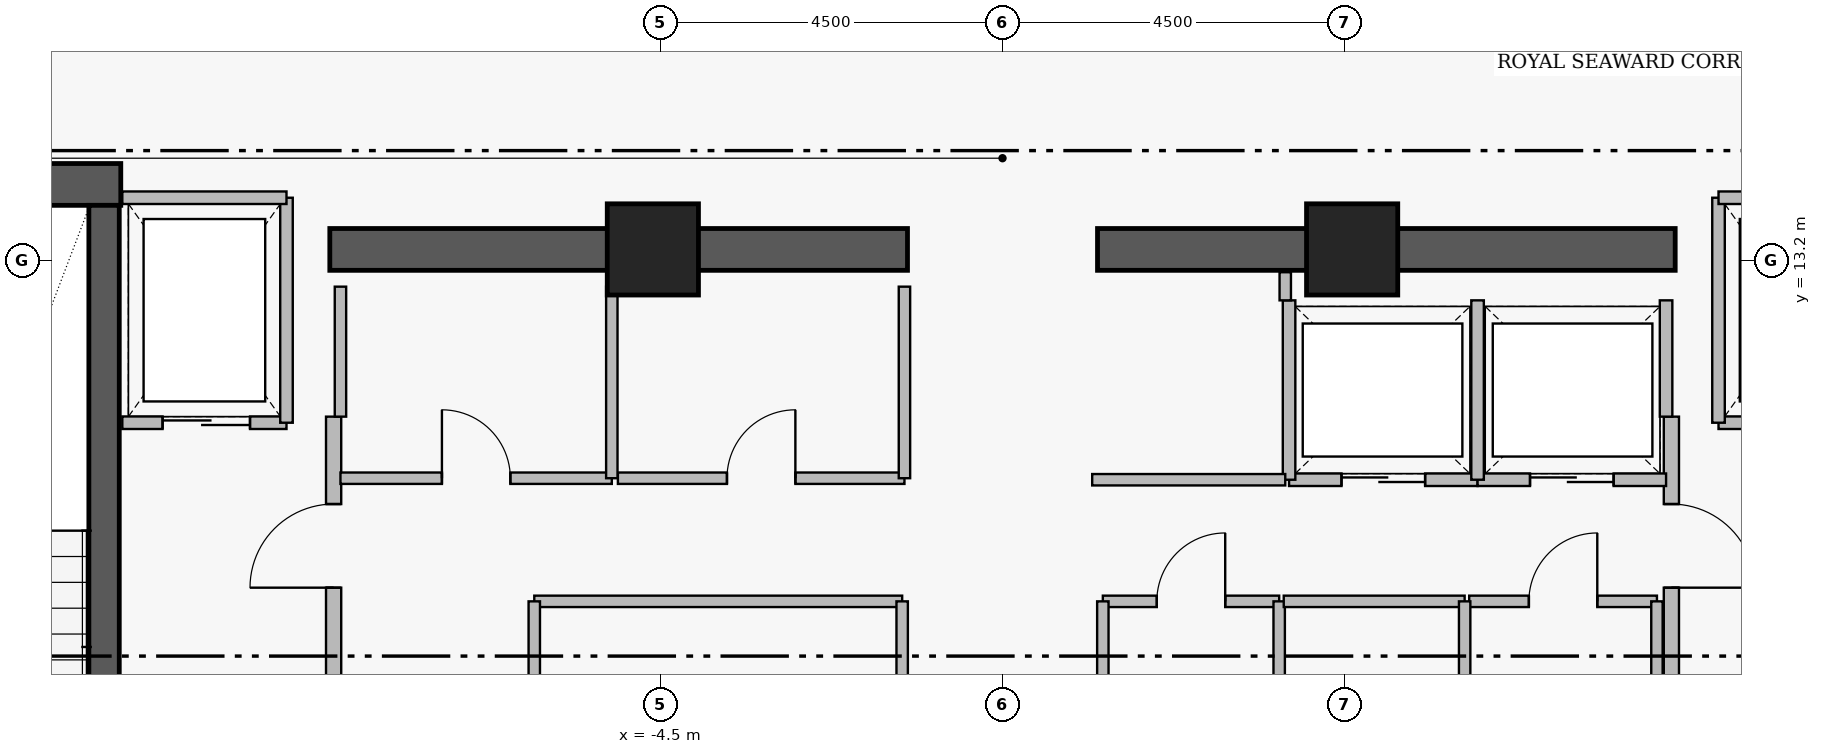
"""IFC4 building model, lengths in metres.
Left out: names, types, materials, properties, quantities, classifications, styles, units other than length and angle.
Written with IfcOpenShell. Run it as: python <this file> out.ifc"""

import sys

from ifc_helpers import new_model, si_unit, direction, frame, frame_2d, origin, origin_2d, place, context, subcontext, project, spatial, rectangle, extrude, element, fill, save


model = new_model("IFC4")
c1 = context("Model", 3, precision=1e-05, world=origin(), true_north=direction((0.0, 1.0)))
c2 = subcontext(c1, "Body", "Model", "MODEL_VIEW")
j1 = project(units=[si_unit("LENGTHUNIT", "METRE"), si_unit("PLANEANGLEUNIT", "RADIAN")], contexts=[c1])
p1 = place(None, origin())
s1 = spatial("IfcSite", under=j1, at=p1, CompositionType="ELEMENT")
p2 = place(p1, origin())
s2 = spatial("IfcBuilding", under=s1, at=p2, CompositionType="ELEMENT")
p3 = place(p2, frame((0.0, 0.0, 239.65)))
s3 = spatial("IfcBuildingStorey", under=s2, at=p3, CompositionType="ELEMENT", Elevation=239.65)
p4 = place(p3, frame((-15.96, 14.205, 0.0), z_axis=(0.0, 0.0, 1.0), x_axis=(1.0, 0.0, 0.0)))
e1 = element("IfcWall", 1, at=p4, inside=s3, PredefinedType="SHEAR", context=c2, shape_type="SweptSolid", body=[
    extrude(rectangle(XDim=4.36, YDim=0.55, at=frame_2d((2.18, 0.0))), origin(), (0.0, 0.0, 1.0), 3.51),
])
for number, where, z_axis, x_axis in (
    (2, (-8.85, 13.35, 0.0), (0.0, 0.0, 1.0), (1.0, 0.0, 0.0)),
    (3, (1.25, 13.35, 0.0), (0.0, 0.0, 1.0), (1.0, 0.0, 0.0)),
):
    element("IfcWall", number, at=place(p3, frame(where, z_axis=z_axis, x_axis=x_axis)), inside=s3, PredefinedType="SHEAR", context=c2, shape_type="SweptSolid", body=[
        extrude(rectangle(XDim=7.6, YDim=0.55, at=frame_2d((3.8, 0.0))), origin(), (0.0, 0.0, 1.0), 3.48),
    ])
p5 = place(p3, frame((-11.82, 4.97, 0.0), z_axis=(0.0, 0.0, 1.0), x_axis=(0.0, 1.0, 0.0)))
e4 = element("IfcWall", 4, at=p5, inside=s3, PredefinedType="SHEAR", context=c2, shape_type="SweptSolid", body=[
    extrude(rectangle(XDim=8.96, YDim=0.4, at=frame_2d((4.48, 0.0))), origin(), (0.0, 0.0, 1.0), 3.51),
])
p6 = place(p5, frame((0.31, 0.0, 0.0)))
e5 = element("IfcOpeningElement", 5, at=p6, cuts=e4, PredefinedType="OPENING", context=c2, shape_type="SweptSolid", body=[
    extrude(rectangle(XDim=1.12, YDim=2.22, at=frame_2d((0.56, 1.11))), frame((0.0, 0.21, 0.0), z_axis=(0.0, -1.0, 0.0), x_axis=(1.0, 0.0, 0.0)), (0.0, 0.0, 1.0), 0.42),
])
for number, where, z_axis, x_axis in (
    (6, (-4.6, 13.35, 0.0), (0.0, 0.0, 1.0), (1.0, 0.0, 0.0)),
    (7, (4.6, 13.35, 0.0), (0.0, 0.0, 1.0), (1.0, 0.0, 0.0)),
):
    element("IfcColumn", number, at=place(p3, frame(where, z_axis=z_axis, x_axis=x_axis)), inside=s3, PredefinedType="COLUMN", context=c2, shape_type="SweptSolid", body=[
        extrude(rectangle(XDim=1.2, YDim=1.2, at=origin_2d()), origin(), (0.0, 0.0, 1.0), 3.7),
    ])
p7 = place(p3, frame((-8.8, 5.05, 0.0), z_axis=(0.0, 0.0, 1.0), x_axis=(0.0, 1.0, 0.0)))
e8 = element("IfcWall", 8, at=p7, inside=s3, PredefinedType="PARTITIONING", context=c2, shape_type="SweptSolid", body=[
    extrude(rectangle(XDim=6.1, YDim=0.2, at=frame_2d((3.05, 0.0))), origin(), (0.0, 0.0, 1.0), 3.48),
])
p8 = place(p7, frame((0.25, 0.0, 0.0)))
e9 = element("IfcOpeningElement", 9, at=p8, cuts=e8, PredefinedType="OPENING", context=c2, shape_type="SweptSolid", body=[
    extrude(rectangle(XDim=1.1, YDim=2.2, at=frame_2d((0.55, 1.1))), frame((0.0, 0.11, 0.0), z_axis=(0.0, -1.0, 0.0), x_axis=(1.0, 0.0, 0.0)), (0.0, 0.0, 1.0), 0.22),
])
p9 = place(p7, frame((3.85, 0.0, 0.0)))
e10 = element("IfcOpeningElement", 10, at=p9, cuts=e8, PredefinedType="OPENING", context=c2, shape_type="SweptSolid", body=[
    extrude(rectangle(XDim=1.1, YDim=2.2, at=frame_2d((0.55, 1.1))), frame((0.0, 0.11, 0.0), z_axis=(0.0, -1.0, 0.0), x_axis=(1.0, 0.0, 0.0)), (0.0, 0.0, 1.0), 0.22),
])
p10 = place(p3, frame((8.8, 11.15, 0.0), z_axis=(0.0, 0.0, 1.0), x_axis=(0.0, -1.0, 0.0)))
e11 = element("IfcWall", 11, at=p10, inside=s3, PredefinedType="PARTITIONING", context=c2, shape_type="SweptSolid", body=[
    extrude(rectangle(XDim=6.1, YDim=0.2, at=frame_2d((3.05, 0.0))), origin(), (0.0, 0.0, 1.0), 3.48),
])
p11 = place(p10, frame((1.15, 0.0, 0.0)))
e12 = element("IfcOpeningElement", 12, at=p11, cuts=e11, PredefinedType="OPENING", context=c2, shape_type="SweptSolid", body=[
    extrude(rectangle(XDim=1.1, YDim=2.2, at=frame_2d((0.55, 1.1))), frame((0.0, 0.11, 0.0), z_axis=(0.0, -1.0, 0.0), x_axis=(1.0, 0.0, 0.0)), (0.0, 0.0, 1.0), 0.22),
])
p12 = place(p10, frame((4.75, 0.0, 0.0)))
e13 = element("IfcOpeningElement", 13, at=p12, cuts=e11, PredefinedType="OPENING", context=c2, shape_type="SweptSolid", body=[
    extrude(rectangle(XDim=1.1, YDim=2.2, at=frame_2d((0.55, 1.1))), frame((0.0, 0.11, 0.0), z_axis=(0.0, -1.0, 0.0), x_axis=(1.0, 0.0, 0.0)), (0.0, 0.0, 1.0), 0.22),
])
p13 = place(p3, frame((-11.58, 11.07, 0.0), z_axis=(0.0, 0.0, 1.0), x_axis=(1.0, 0.0, 0.0)))
e14 = element("IfcWall", 14, at=p13, inside=s3, PredefinedType="PARTITIONING", context=c2, shape_type="SweptSolid", body=[
    extrude(rectangle(XDim=2.16, YDim=0.165, at=frame_2d((1.08, 0.0))), origin(), (0.0, 0.0, 1.0), 3.48),
])
p14 = place(p13, frame((0.53, 0.0, 0.0)))
e15 = element("IfcOpeningElement", 15, at=p14, cuts=e14, PredefinedType="OPENING", context=c2, shape_type="SweptSolid", body=[
    extrude(rectangle(XDim=1.15, YDim=2.25, at=frame_2d((0.575, 1.125))), frame((0.0, 0.093, 0.0), z_axis=(0.0, -1.0, 0.0), x_axis=(1.0, 0.0, 0.0)), (0.0, 0.0, 1.0), 0.185),
])
p15 = place(p3, frame((9.42, 11.07, 0.0), z_axis=(0.0, 0.0, 1.0), x_axis=(1.0, 0.0, 0.0)))
e16 = element("IfcWall", 16, at=p15, inside=s3, PredefinedType="PARTITIONING", context=c2, shape_type="SweptSolid", body=[
    extrude(rectangle(XDim=2.16, YDim=0.165, at=frame_2d((1.08, 0.0))), origin(), (0.0, 0.0, 1.0), 3.48),
])
p16 = place(p15, frame((0.53, 0.0, 0.0)))
e17 = element("IfcOpeningElement", 17, at=p16, cuts=e16, PredefinedType="OPENING", context=c2, shape_type="SweptSolid", body=[
    extrude(rectangle(XDim=1.15, YDim=2.25, at=frame_2d((0.575, 1.125))), frame((0.0, 0.093, 0.0), z_axis=(0.0, -1.0, 0.0), x_axis=(1.0, 0.0, 0.0)), (0.0, 0.0, 1.0), 0.185),
])
p17 = place(p3, frame((3.77, 10.32, 0.0), z_axis=(0.0, 0.0, 1.0), x_axis=(1.0, 0.0, 0.0)))
e18 = element("IfcWall", 18, at=p17, inside=s3, PredefinedType="PARTITIONING", context=c2, shape_type="SweptSolid", body=[
    extrude(rectangle(XDim=2.48, YDim=0.165, at=frame_2d((1.24, 0.0))), origin(), (0.0, 0.0, 1.0), 3.48),
])
p18 = place(p17, frame((0.69, 0.0, 0.0)))
e19 = element("IfcOpeningElement", 19, at=p18, cuts=e18, PredefinedType="OPENING", context=c2, shape_type="SweptSolid", body=[
    extrude(rectangle(XDim=1.1, YDim=2.25, at=frame_2d((0.55, 1.125))), frame((0.0, 0.093, 0.0), z_axis=(0.0, -1.0, 0.0), x_axis=(1.0, 0.0, 0.0)), (0.0, 0.0, 1.0), 0.185),
])
p19 = place(p3, frame((6.25, 10.32, 0.0), z_axis=(0.0, 0.0, 1.0), x_axis=(1.0, 0.0, 0.0)))
e20 = element("IfcWall", 20, at=p19, inside=s3, PredefinedType="PARTITIONING", context=c2, shape_type="SweptSolid", body=[
    extrude(rectangle(XDim=2.48, YDim=0.165, at=frame_2d((1.24, 0.0))), origin(), (0.0, 0.0, 1.0), 3.48),
])
p20 = place(p19, frame((0.69, 0.0, 0.0)))
e21 = element("IfcOpeningElement", 21, at=p20, cuts=e20, PredefinedType="OPENING", context=c2, shape_type="SweptSolid", body=[
    extrude(rectangle(XDim=1.1, YDim=2.25, at=frame_2d((0.55, 1.125))), frame((0.0, 0.093, 0.0), z_axis=(0.0, -1.0, 0.0), x_axis=(1.0, 0.0, 0.0)), (0.0, 0.0, 1.0), 0.185),
])
p21 = place(p3, frame((-8.71, 10.34, 0.0), z_axis=(0.0, 0.0, 1.0), x_axis=(1.0, 0.0, 0.0)))
e22 = element("IfcWall", 22, at=p21, inside=s3, PredefinedType="PARTITIONING", context=c2, shape_type="SweptSolid", body=[
    extrude(rectangle(XDim=3.57, YDim=0.15, at=frame_2d((1.785, 0.0))), origin(), (0.0, 0.0, 1.0), 3.48),
])
p22 = place(p21, frame((1.335, 0.0, 0.0)))
e23 = element("IfcOpeningElement", 23, at=p22, cuts=e22, PredefinedType="OPENING", context=c2, shape_type="SweptSolid", body=[
    extrude(rectangle(XDim=0.9, YDim=2.15, at=frame_2d((0.45, 1.075))), frame((0.0, 0.085, 0.0), z_axis=(0.0, -1.0, 0.0), x_axis=(1.0, 0.0, 0.0)), (0.0, 0.0, 1.0), 0.17),
])
p23 = place(p3, frame((-5.06, 10.34, 0.0), z_axis=(0.0, 0.0, 1.0), x_axis=(1.0, 0.0, 0.0)))
e24 = element("IfcWall", 24, at=p23, inside=s3, PredefinedType="PARTITIONING", context=c2, shape_type="SweptSolid", body=[
    extrude(rectangle(XDim=3.77, YDim=0.15, at=frame_2d((1.885, 0.0))), origin(), (0.0, 0.0, 1.0), 3.48),
])
p24 = place(p23, frame((1.435, 0.0, 0.0)))
e25 = element("IfcOpeningElement", 25, at=p24, cuts=e24, PredefinedType="OPENING", context=c2, shape_type="SweptSolid", body=[
    extrude(rectangle(XDim=0.9, YDim=2.15, at=frame_2d((0.45, 1.075))), frame((0.0, 0.085, 0.0), z_axis=(0.0, -1.0, 0.0), x_axis=(1.0, 0.0, 0.0)), (0.0, 0.0, 1.0), 0.17),
])
p25 = place(p3, frame((1.32, 8.72, 0.0), z_axis=(0.0, 0.0, 1.0), x_axis=(1.0, 0.0, 0.0)))
e26 = element("IfcWall", 26, at=p25, inside=s3, PredefinedType="PARTITIONING", context=c2, shape_type="SweptSolid", body=[
    extrude(rectangle(XDim=2.32, YDim=0.15, at=frame_2d((1.16, 0.0))), origin(), (0.0, 0.0, 1.0), 3.48),
])
p26 = place(p25, frame((0.71, 0.0, 0.0)))
e27 = element("IfcOpeningElement", 27, at=p26, cuts=e26, PredefinedType="OPENING", context=c2, shape_type="SweptSolid", body=[
    extrude(rectangle(XDim=0.9, YDim=2.15, at=frame_2d((0.45, 1.075))), frame((0.0, 0.085, 0.0), z_axis=(0.0, -1.0, 0.0), x_axis=(1.0, 0.0, 0.0)), (0.0, 0.0, 1.0), 0.17),
])
p27 = place(p3, frame((6.14, 8.72, 0.0), z_axis=(0.0, 0.0, 1.0), x_axis=(1.0, 0.0, 0.0)))
e28 = element("IfcWall", 28, at=p27, inside=s3, PredefinedType="PARTITIONING", context=c2, shape_type="SweptSolid", body=[
    extrude(rectangle(XDim=2.47, YDim=0.15, at=frame_2d((1.235, 0.0))), origin(), (0.0, 0.0, 1.0), 3.48),
])
p28 = place(p27, frame((0.785, 0.0, 0.0)))
e29 = element("IfcOpeningElement", 29, at=p28, cuts=e28, PredefinedType="OPENING", context=c2, shape_type="SweptSolid", body=[
    extrude(rectangle(XDim=0.9, YDim=2.15, at=frame_2d((0.45, 1.075))), frame((0.0, 0.085, 0.0), z_axis=(0.0, -1.0, 0.0), x_axis=(1.0, 0.0, 0.0)), (0.0, 0.0, 1.0), 0.17),
])
p29 = place(p3, frame((-9.42, 11.07, 0.0), z_axis=(0.0, 0.0, 1.0), x_axis=(0.0, 1.0, 0.0)))
e30 = element("IfcWall", 30, at=p29, inside=s3, PredefinedType="PARTITIONING", context=c2, shape_type="SweptSolid", body=[
    extrude(rectangle(XDim=2.96, YDim=0.165, at=frame_2d((1.48, 0.0))), origin(), (0.0, 0.0, 1.0), 3.48),
])
p30 = place(p3, frame((-11.58, 14.03, 0.0), z_axis=(0.0, 0.0, 1.0), x_axis=(1.0, 0.0, 0.0)))
e31 = element("IfcWall", 31, at=p30, inside=s3, PredefinedType="PARTITIONING", context=c2, shape_type="SweptSolid", body=[
    extrude(rectangle(XDim=2.16, YDim=0.165, at=frame_2d((1.08, 0.0))), origin(), (0.0, 0.0, 1.0), 3.48),
])
p31 = place(p3, frame((9.42, 11.07, 0.0), z_axis=(0.0, 0.0, 1.0), x_axis=(0.0, 1.0, 0.0)))
e32 = element("IfcWall", 32, at=p31, inside=s3, PredefinedType="PARTITIONING", context=c2, shape_type="SweptSolid", body=[
    extrude(rectangle(XDim=2.96, YDim=0.165, at=frame_2d((1.48, 0.0))), origin(), (0.0, 0.0, 1.0), 3.48),
])
p32 = place(p3, frame((9.42, 14.03, 0.0), z_axis=(0.0, 0.0, 1.0), x_axis=(1.0, 0.0, 0.0)))
e33 = element("IfcWall", 33, at=p32, inside=s3, PredefinedType="PARTITIONING", context=c2, shape_type="SweptSolid", body=[
    extrude(rectangle(XDim=2.16, YDim=0.165, at=frame_2d((1.08, 0.0))), origin(), (0.0, 0.0, 1.0), 3.48),
])
for number, where, z_axis, x_axis in (
    (34, (3.77, 10.32, 0.0), (0.0, 0.0, 1.0), (0.0, 1.0, 0.0)),
    (35, (6.25, 10.32, 0.0), (0.0, 0.0, 1.0), (0.0, 1.0, 0.0)),
):
    element("IfcWall", number, at=place(p3, frame(where, z_axis=z_axis, x_axis=x_axis)), inside=s3, PredefinedType="PARTITIONING", context=c2, shape_type="SweptSolid", body=[
        extrude(rectangle(XDim=2.36, YDim=0.165, at=frame_2d((1.18, 0.0))), origin(), (0.0, 0.0, 1.0), 3.48),
    ])
p33 = place(p3, frame((8.73, 11.15, 0.0), z_axis=(0.0, 0.0, 1.0), x_axis=(0.0, 1.0, 0.0)))
e36 = element("IfcWall", 36, at=p33, inside=s3, PredefinedType="PARTITIONING", context=c2, shape_type="SweptSolid", body=[
    extrude(rectangle(XDim=1.53, YDim=0.165, at=frame_2d((0.765, 0.0))), origin(), (0.0, 0.0, 1.0), 3.48),
])
p34 = place(p3, frame((-8.71, 11.15, 0.0), z_axis=(0.0, 0.0, 1.0), x_axis=(0.0, 1.0, 0.0)))
e37 = element("IfcWall", 37, at=p34, inside=s3, PredefinedType="PARTITIONING", context=c2, shape_type="SweptSolid", body=[
    extrude(rectangle(XDim=1.71, YDim=0.15, at=frame_2d((0.855, 0.0))), origin(), (0.0, 0.0, 1.0), 3.48),
])
for number, where, z_axis, x_axis in (
    (38, (-5.14, 10.34, 0.0), (0.0, 0.0, 1.0), (0.0, 1.0, 0.0)),
    (39, (-1.29, 10.34, 0.0), (0.0, 0.0, 1.0), (0.0, 1.0, 0.0)),
):
    element("IfcWall", number, at=place(p3, frame(where, z_axis=z_axis, x_axis=x_axis)), inside=s3, PredefinedType="PARTITIONING", context=c2, shape_type="SweptSolid", body=[
        extrude(rectangle(XDim=2.52, YDim=0.15, at=frame_2d((1.26, 0.0))), origin(), (0.0, 0.0, 1.0), 3.48),
    ])
p35 = place(p3, frame((-6.16, 8.72, 0.0), z_axis=(0.0, 0.0, 1.0), x_axis=(1.0, 0.0, 0.0)))
e40 = element("IfcWall", 40, at=p35, inside=s3, PredefinedType="PARTITIONING", context=c2, shape_type="SweptSolid", body=[
    extrude(rectangle(XDim=4.84, YDim=0.15, at=frame_2d((2.42, 0.0))), origin(), (0.0, 0.0, 1.0), 3.48),
])
for number, where, z_axis, x_axis in (
    (41, (-6.16, 6.48, 0.0), (0.0, 0.0, 1.0), (0.0, 1.0, 0.0)),
    (42, (-1.32, 6.48, 0.0), (0.0, 0.0, 1.0), (0.0, 1.0, 0.0)),
    (43, (1.32, 6.48, 0.0), (0.0, 0.0, 1.0), (0.0, 1.0, 0.0)),
    (44, (3.64, 6.48, 0.0), (0.0, 0.0, 1.0), (0.0, 1.0, 0.0)),
):
    element("IfcWall", number, at=place(p3, frame(where, z_axis=z_axis, x_axis=x_axis)), inside=s3, PredefinedType="PARTITIONING", context=c2, shape_type="SweptSolid", body=[
        extrude(rectangle(XDim=2.24, YDim=0.15, at=frame_2d((1.12, 0.0))), origin(), (0.0, 0.0, 1.0), 3.48),
    ])
p36 = place(p3, frame((3.7, 8.72, 0.0), z_axis=(0.0, 0.0, 1.0), x_axis=(1.0, 0.0, 0.0)))
e45 = element("IfcWall", 45, at=p36, inside=s3, PredefinedType="PARTITIONING", context=c2, shape_type="SweptSolid", body=[
    extrude(rectangle(XDim=2.38, YDim=0.15, at=frame_2d((1.19, 0.0))), origin(), (0.0, 0.0, 1.0), 3.48),
])
for number, where, z_axis, x_axis in (
    (46, (6.08, 6.48, 0.0), (0.0, 0.0, 1.0), (0.0, 1.0, 0.0)),
    (47, (8.61, 6.48, 0.0), (0.0, 0.0, 1.0), (0.0, 1.0, 0.0)),
):
    element("IfcWall", number, at=place(p3, frame(where, z_axis=z_axis, x_axis=x_axis)), inside=s3, PredefinedType="PARTITIONING", context=c2, shape_type="SweptSolid", body=[
        extrude(rectangle(XDim=2.24, YDim=0.15, at=frame_2d((1.12, 0.0))), origin(), (0.0, 0.0, 1.0), 3.48),
    ])
p37 = place(p3, frame((1.18, 10.32, 0.0), z_axis=(0.0, 0.0, 1.0), x_axis=(1.0, 0.0, 0.0)))
e48 = element("IfcWall", 48, at=p37, inside=s3, PredefinedType="PARTITIONING", context=c2, shape_type="SweptSolid", body=[
    extrude(rectangle(XDim=2.54, YDim=0.15, at=frame_2d((1.27, 0.0))), origin(), (0.0, 0.0, 1.0), 3.48),
])
p38 = place(p3, frame((3.72, 12.68, 0.0), z_axis=(0.0, 0.0, 1.0), x_axis=(0.0, 1.0, 0.0)))
e49 = element("IfcWall", 49, at=p38, inside=s3, PredefinedType="PARTITIONING", context=c2, shape_type="SweptSolid", body=[
    extrude(rectangle(XDim=0.37, YDim=0.15, at=frame_2d((0.185, 0.0))), origin(), (0.0, 0.0, 1.0), 3.48),
])
p39 = place(p9, origin())
e50 = element("IfcDoor", 50, at=p39, inside=s3, OperationType="SINGLE_SWING_LEFT", PredefinedType="DOOR", context=c2, shape_type="SweptSolid", body=[
    extrude(rectangle(XDim=1.1, YDim=2.2, at=frame_2d((0.55, 1.1))), frame((0.0, 0.025, 0.0), z_axis=(0.0, -1.0, 0.0), x_axis=(1.0, 0.0, 0.0)), (0.0, 0.0, 1.0), 0.05),
])
fill(e10, e50)
p40 = place(p11, origin())
e51 = element("IfcDoor", 51, at=p40, inside=s3, OperationType="SINGLE_SWING_RIGHT", PredefinedType="DOOR", context=c2, shape_type="SweptSolid", body=[
    extrude(rectangle(XDim=1.1, YDim=2.2, at=frame_2d((0.55, 1.1))), frame((0.0, 0.025, 0.0), z_axis=(0.0, -1.0, 0.0), x_axis=(1.0, 0.0, 0.0)), (0.0, 0.0, 1.0), 0.05),
])
fill(e12, e51)
p41 = place(p14, origin())
e52 = element("IfcDoor", 52, at=p41, inside=s3, OperationType="SLIDING_TO_LEFT", PredefinedType="DOOR", context=c2, shape_type="SweptSolid", body=[
    extrude(rectangle(XDim=1.15, YDim=2.25, at=frame_2d((0.575, 1.125))), frame((0.0, 0.025, 0.0), z_axis=(0.0, -1.0, 0.0), x_axis=(1.0, 0.0, 0.0)), (0.0, 0.0, 1.0), 0.05),
])
fill(e15, e52)
p42 = place(p18, origin())
e53 = element("IfcDoor", 53, at=p42, inside=s3, OperationType="SLIDING_TO_LEFT", PredefinedType="DOOR", context=c2, shape_type="SweptSolid", body=[
    extrude(rectangle(XDim=1.1, YDim=2.25, at=frame_2d((0.55, 1.125))), frame((0.0, 0.025, 0.0), z_axis=(0.0, -1.0, 0.0), x_axis=(1.0, 0.0, 0.0)), (0.0, 0.0, 1.0), 0.05),
])
fill(e19, e53)
p43 = place(p20, origin())
e54 = element("IfcDoor", 54, at=p43, inside=s3, OperationType="SLIDING_TO_LEFT", PredefinedType="DOOR", context=c2, shape_type="SweptSolid", body=[
    extrude(rectangle(XDim=1.1, YDim=2.25, at=frame_2d((0.55, 1.125))), frame((0.0, 0.025, 0.0), z_axis=(0.0, -1.0, 0.0), x_axis=(1.0, 0.0, 0.0)), (0.0, 0.0, 1.0), 0.05),
])
fill(e21, e54)
p44 = place(p22, origin())
e55 = element("IfcDoor", 55, at=p44, inside=s3, OperationType="SINGLE_SWING_LEFT", PredefinedType="DOOR", context=c2, shape_type="SweptSolid", body=[
    extrude(rectangle(XDim=0.9, YDim=2.15, at=frame_2d((0.45, 1.075))), frame((0.0, 0.025, 0.0), z_axis=(0.0, -1.0, 0.0), x_axis=(1.0, 0.0, 0.0)), (0.0, 0.0, 1.0), 0.05),
])
fill(e23, e55)
p45 = place(p24, origin())
e56 = element("IfcDoor", 56, at=p45, inside=s3, OperationType="SINGLE_SWING_RIGHT", PredefinedType="DOOR", context=c2, shape_type="SweptSolid", body=[
    extrude(rectangle(XDim=0.9, YDim=2.15, at=frame_2d((0.45, 1.075))), frame((0.0, 0.025, 0.0), z_axis=(0.0, -1.0, 0.0), x_axis=(1.0, 0.0, 0.0)), (0.0, 0.0, 1.0), 0.05),
])
fill(e25, e56)
p46 = place(p26, origin())
e57 = element("IfcDoor", 57, at=p46, inside=s3, OperationType="SINGLE_SWING_RIGHT", PredefinedType="DOOR", context=c2, shape_type="SweptSolid", body=[
    extrude(rectangle(XDim=0.9, YDim=2.15, at=frame_2d((0.45, 1.075))), frame((0.0, 0.025, 0.0), z_axis=(0.0, -1.0, 0.0), x_axis=(1.0, 0.0, 0.0)), (0.0, 0.0, 1.0), 0.05),
])
fill(e27, e57)
p47 = place(p28, origin())
e58 = element("IfcDoor", 58, at=p47, inside=s3, OperationType="SINGLE_SWING_RIGHT", PredefinedType="DOOR", context=c2, shape_type="SweptSolid", body=[
    extrude(rectangle(XDim=0.9, YDim=2.15, at=frame_2d((0.45, 1.075))), frame((0.0, 0.025, 0.0), z_axis=(0.0, -1.0, 0.0), x_axis=(1.0, 0.0, 0.0)), (0.0, 0.0, 1.0), 0.05),
])
fill(e29, e58)
save(model, sys.argv[1])
